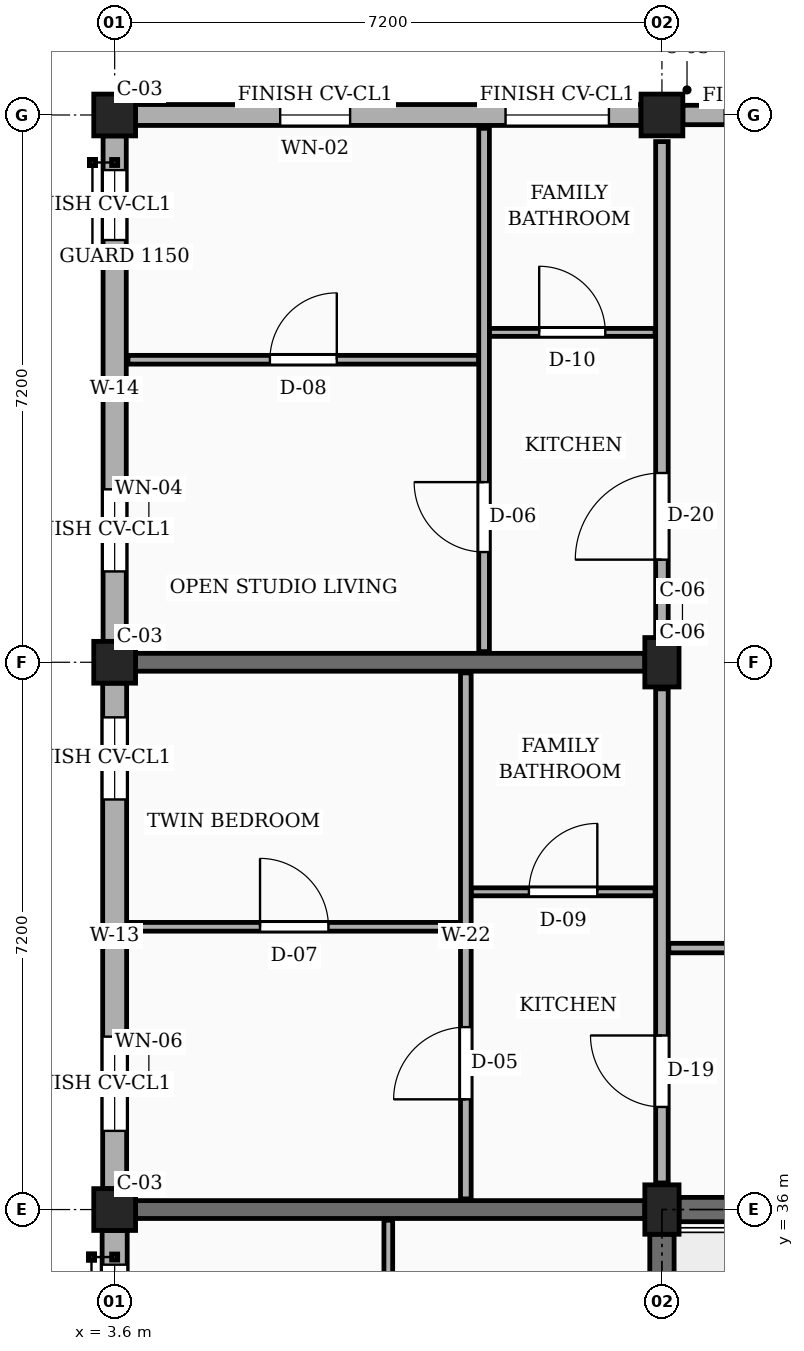
"""IFC4 building model, lengths in metres.
Left out: names, types, materials, properties, quantities, classifications, styles, units other than length and angle.
Written with IfcOpenShell. Run it as: python <this file> out.ifc"""

import sys

from ifc_helpers import new_model, si_unit, direction, frame, frame_2d, origin, origin_2d, place, context, subcontext, project, spatial, rectangle, extrude, element, fill, save


model = new_model("IFC4")
c1 = context("Model", 3, precision=1e-05, world=origin(), true_north=direction((0.0, 1.0)))
c2 = subcontext(c1, "Body", "Model", "MODEL_VIEW")
j1 = project(units=[si_unit("LENGTHUNIT", "METRE"), si_unit("PLANEANGLEUNIT", "RADIAN")], contexts=[c1])
p1 = place(None, origin())
s1 = spatial("IfcSite", under=j1, at=p1, CompositionType="ELEMENT")
p2 = place(p1, origin())
s2 = spatial("IfcBuilding", under=s1, at=p2, CompositionType="ELEMENT")
p3 = place(p2, frame((0.0, 0.0, 13.95)))
s3 = spatial("IfcBuildingStorey", under=s2, at=p3, CompositionType="ELEMENT", Elevation=13.95)
for number, where, z_axis, x_axis in (
    (1, (3.6, 36.0, 0.0), (0.0, 0.0, 1.0), (1.0, 0.0, 0.0)),
    (2, (3.6, 43.2, 0.0), (0.0, 0.0, 1.0), (1.0, 0.0, 0.0)),
    (3, (3.6, 50.4, 0.0), (0.0, 0.0, 1.0), (1.0, 0.0, 0.0)),
):
    element("IfcColumn", number, at=place(p3, frame(where, z_axis=z_axis, x_axis=x_axis)), inside=s3, PredefinedType="COLUMN", context=c2, shape_type="SweptSolid", body=[
        extrude(rectangle(XDim=0.55, YDim=0.55, at=origin_2d()), origin(), (0.0, 0.0, 1.0), 3.15),
    ])
for number, where, z_axis, x_axis in (
    (4, (10.8, 36.0, 0.0), (0.0, 0.0, 1.0), (1.0, 0.0, 0.0)),
    (5, (10.8, 43.2, 0.0), (0.0, 0.0, 1.0), (1.0, 0.0, 0.0)),
):
    element("IfcColumn", number, at=place(p3, frame(where, z_axis=z_axis, x_axis=x_axis)), inside=s3, PredefinedType="COLUMN", context=c2, shape_type="SweptSolid", body=[
        extrude(rectangle(XDim=0.45, YDim=0.65, at=origin_2d()), origin(), (0.0, 0.0, 1.0), 3.15),
    ])
p4 = place(p3, frame((10.8, 50.4, 0.0), z_axis=(0.0, 0.0, 1.0), x_axis=(1.0, 0.0, 0.0)))
e6 = element("IfcColumn", 6, at=p4, inside=s3, PredefinedType="COLUMN", context=c2, shape_type="SweptSolid", body=[
    extrude(rectangle(XDim=0.55, YDim=0.55, at=origin_2d()), origin(), (0.0, 0.0, 1.0), 3.15),
])
for number, where, z_axis, x_axis in (
    (7, (3.875, 36.0, 0.0), (0.0, 0.0, 1.0), (1.0, 0.0, 0.0)),
    (8, (3.875, 43.2, 0.0), (0.0, 0.0, 1.0), (1.0, 0.0, 0.0)),
):
    element("IfcWall", number, at=place(p3, frame(where, z_axis=z_axis, x_axis=x_axis)), inside=s3, PredefinedType="SOLIDWALL", context=c2, shape_type="SweptSolid", body=[
        extrude(rectangle(XDim=6.7, YDim=0.235, at=frame_2d((3.35, 0.0))), origin(), (0.0, 0.0, 1.0), 2.17),
    ])
p5 = place(p3, frame((17.725, 50.4, 0.0), z_axis=(0.0, 0.0, 1.0), x_axis=(-1.0, 0.0, 0.0)))
e9 = element("IfcWall", 9, at=p5, inside=s3, PredefinedType="SOLIDWALL", context=c2, shape_type="SweptSolid", body=[
    extrude(rectangle(XDim=6.65, YDim=0.255, at=frame_2d((3.325, 0.0))), origin(), (0.0, 0.0, 1.0), 2.44),
])
p6 = place(p5, frame((0.45, 0.0, 0.78)))
e10 = element("IfcOpeningElement", 10, at=p6, cuts=e9, PredefinedType="OPENING", context=c2, shape_type="SweptSolid", body=[
    extrude(rectangle(XDim=1.25, YDim=1.44, at=frame_2d((0.625, 0.72))), frame((0.0, 0.137, 0.0), z_axis=(0.0, -1.0, 0.0), x_axis=(1.0, 0.0, 0.0)), (0.0, 0.0, 1.0), 0.275),
])
p7 = place(p5, frame((4.65, 0.0, 0.78)))
e11 = element("IfcOpeningElement", 11, at=p7, cuts=e9, PredefinedType="OPENING", context=c2, shape_type="SweptSolid", body=[
    extrude(rectangle(XDim=1.45, YDim=1.44, at=frame_2d((0.725, 0.72))), frame((0.0, 0.137, 0.0), z_axis=(0.0, -1.0, 0.0), x_axis=(1.0, 0.0, 0.0)), (0.0, 0.0, 1.0), 0.275),
])
p8 = place(p3, frame((10.525, 50.4, 0.0), z_axis=(0.0, 0.0, 1.0), x_axis=(-1.0, 0.0, 0.0)))
e12 = element("IfcWall", 12, at=p8, inside=s3, PredefinedType="SOLIDWALL", context=c2, shape_type="SweptSolid", body=[
    extrude(rectangle(XDim=6.65, YDim=0.275, at=frame_2d((3.325, 0.0))), origin(), (0.0, 0.0, 1.0), 2.44),
])
p9 = place(p8, frame((0.423, 0.0, 0.78)))
e13 = element("IfcOpeningElement", 13, at=p9, cuts=e12, PredefinedType="OPENING", context=c2, shape_type="SweptSolid", body=[
    extrude(rectangle(XDim=1.36, YDim=1.26, at=frame_2d((0.68, 0.63))), frame((0.0, 0.147, 0.0), z_axis=(0.0, -1.0, 0.0), x_axis=(1.0, 0.0, 0.0)), (0.0, 0.0, 1.0), 0.295),
])
p10 = place(p8, frame((3.827, 0.0, 0.78)))
e14 = element("IfcOpeningElement", 14, at=p10, cuts=e12, PredefinedType="OPENING", context=c2, shape_type="SweptSolid", body=[
    extrude(rectangle(XDim=0.92, YDim=1.15, at=frame_2d((0.46, 0.575))), frame((0.0, 0.147, 0.0), z_axis=(0.0, -1.0, 0.0), x_axis=(1.0, 0.0, 0.0)), (0.0, 0.0, 1.0), 0.295),
])
p11 = place(p3, frame((3.6, 50.125, 0.0), z_axis=(0.0, 0.0, 1.0), x_axis=(0.0, -1.0, 0.0)))
e15 = element("IfcWall", 15, at=p11, inside=s3, PredefinedType="SOLIDWALL", context=c2, shape_type="SweptSolid", body=[
    extrude(rectangle(XDim=6.65, YDim=0.305, at=frame_2d((3.325, 0.0))), origin(), (0.0, 0.0, 1.0), 2.44),
])
p12 = place(p11, frame((0.45, 0.0, 0.78)))
e16 = element("IfcOpeningElement", 16, at=p12, cuts=e15, PredefinedType="OPENING", context=c2, shape_type="SweptSolid", body=[
    extrude(rectangle(XDim=0.92, YDim=1.15, at=frame_2d((0.46, 0.575))), frame((0.0, 0.163, 0.0), z_axis=(0.0, -1.0, 0.0), x_axis=(1.0, 0.0, 0.0)), (0.0, 0.0, 1.0), 0.325),
])
p13 = place(p11, frame((4.65, 0.0, 0.78)))
e17 = element("IfcOpeningElement", 17, at=p13, cuts=e15, PredefinedType="OPENING", context=c2, shape_type="SweptSolid", body=[
    extrude(rectangle(XDim=1.08, YDim=1.15, at=frame_2d((0.54, 0.575))), frame((0.0, 0.163, 0.0), z_axis=(0.0, -1.0, 0.0), x_axis=(1.0, 0.0, 0.0)), (0.0, 0.0, 1.0), 0.325),
])
p14 = place(p3, frame((3.6, 42.925, 0.0), z_axis=(0.0, 0.0, 1.0), x_axis=(0.0, -1.0, 0.0)))
e18 = element("IfcWall", 18, at=p14, inside=s3, PredefinedType="SOLIDWALL", context=c2, shape_type="SweptSolid", body=[
    extrude(rectangle(XDim=6.65, YDim=0.315, at=frame_2d((3.325, 0.0))), origin(), (0.0, 0.0, 1.0), 2.44),
])
p15 = place(p14, frame((0.45, 0.0, 0.78)))
e19 = element("IfcOpeningElement", 19, at=p15, cuts=e18, PredefinedType="OPENING", context=c2, shape_type="SweptSolid", body=[
    extrude(rectangle(XDim=1.08, YDim=1.15, at=frame_2d((0.54, 0.575))), frame((0.0, 0.167, 0.0), z_axis=(0.0, -1.0, 0.0), x_axis=(1.0, 0.0, 0.0)), (0.0, 0.0, 1.0), 0.335),
])
p16 = place(p14, frame((4.65, 0.0, 0.78)))
e20 = element("IfcOpeningElement", 20, at=p16, cuts=e18, PredefinedType="OPENING", context=c2, shape_type="SweptSolid", body=[
    extrude(rectangle(XDim=1.24, YDim=1.15, at=frame_2d((0.62, 0.575))), frame((0.0, 0.167, 0.0), z_axis=(0.0, -1.0, 0.0), x_axis=(1.0, 0.0, 0.0)), (0.0, 0.0, 1.0), 0.335),
])
p17 = place(p3, frame((3.6, 35.725, 0.0), z_axis=(0.0, 0.0, 1.0), x_axis=(0.0, -1.0, 0.0)))
e21 = element("IfcWall", 21, at=p17, inside=s3, PredefinedType="SOLIDWALL", context=c2, shape_type="SweptSolid", body=[
    extrude(rectangle(XDim=6.65, YDim=0.33, at=frame_2d((3.325, 0.0))), origin(), (0.0, 0.0, 1.0), 2.44),
])
p18 = place(p17, frame((0.45, 0.0, 0.78)))
e22 = element("IfcOpeningElement", 22, at=p18, cuts=e21, PredefinedType="OPENING", context=c2, shape_type="SweptSolid", body=[
    extrude(rectangle(XDim=1.24, YDim=1.15, at=frame_2d((0.62, 0.575))), frame((0.0, 0.175, 0.0), z_axis=(0.0, -1.0, 0.0), x_axis=(1.0, 0.0, 0.0)), (0.0, 0.0, 1.0), 0.35),
])
p19 = place(p17, frame((4.65, 0.0, 0.78)))
e23 = element("IfcOpeningElement", 23, at=p19, cuts=e21, PredefinedType="OPENING", context=c2, shape_type="SweptSolid", body=[
    extrude(rectangle(XDim=1.4, YDim=1.15, at=frame_2d((0.7, 0.575))), frame((0.0, 0.175, 0.0), z_axis=(0.0, -1.0, 0.0), x_axis=(1.0, 0.0, 0.0)), (0.0, 0.0, 1.0), 0.35),
])
p20 = place(p3, frame((10.8, 29.125, 0.0), z_axis=(0.0, 0.0, 1.0), x_axis=(0.0, 1.0, 0.0)))
e24 = element("IfcWall", 24, at=p20, inside=s3, PredefinedType="SHEAR", context=c2, shape_type="SweptSolid", body=[
    extrude(rectangle(XDim=6.55, YDim=0.32, at=frame_2d((3.275, 0.0))), origin(), (0.0, 0.0, 1.0), 2.87),
])
p21 = place(p3, frame((11.025, 36.0, 0.0), z_axis=(0.0, 0.0, 1.0), x_axis=(1.0, 0.0, 0.0)))
e25 = element("IfcWall", 25, at=p21, inside=s3, PredefinedType="SHEAR", context=c2, shape_type="SweptSolid", body=[
    extrude(rectangle(XDim=6.75, YDim=0.32, at=frame_2d((3.375, 0.0))), origin(), (0.0, 0.0, 1.0), 2.87),
])
p22 = place(p3, frame((10.8, 36.35, 0.0), z_axis=(0.0, 0.0, 1.0), x_axis=(0.0, 1.0, 0.0)))
e26 = element("IfcWall", 26, at=p22, inside=s3, PredefinedType="PARTITIONING", context=c2, shape_type="SweptSolid", body=[
    extrude(rectangle(XDim=6.5, YDim=0.165, at=frame_2d((3.25, 0.0))), origin(), (0.0, 0.0, 1.0), 2.305),
])
p23 = place(p22, frame((1.0, 0.0, 0.0)))
e27 = element("IfcOpeningElement", 27, at=p23, cuts=e26, PredefinedType="OPENING", context=c2, shape_type="SweptSolid", body=[
    extrude(rectangle(XDim=0.94, YDim=2.12, at=frame_2d((0.47, 1.06))), frame((0.0, 0.093, 0.0), z_axis=(0.0, -1.0, 0.0), x_axis=(1.0, 0.0, 0.0)), (0.0, 0.0, 1.0), 0.185),
])
p24 = place(p3, frame((10.8, 43.55, 0.0), z_axis=(0.0, 0.0, 1.0), x_axis=(0.0, 1.0, 0.0)))
e28 = element("IfcWall", 28, at=p24, inside=s3, PredefinedType="PARTITIONING", context=c2, shape_type="SweptSolid", body=[
    extrude(rectangle(XDim=6.5, YDim=0.165, at=frame_2d((3.25, 0.0))), origin(), (0.0, 0.0, 1.0), 2.305),
])
p25 = place(p24, frame((1.0, 0.0, 0.0)))
e29 = element("IfcOpeningElement", 29, at=p25, cuts=e28, PredefinedType="OPENING", context=c2, shape_type="SweptSolid", body=[
    extrude(rectangle(XDim=1.14, YDim=2.18, at=frame_2d((0.57, 1.09))), frame((0.0, 0.093, 0.0), z_axis=(0.0, -1.0, 0.0), x_axis=(1.0, 0.0, 0.0)), (0.0, 0.0, 1.0), 0.185),
])
p26 = place(p3, frame((7.2, 28.94, 0.0), z_axis=(0.0, 0.0, 1.0), x_axis=(0.0, 1.0, 0.0)))
e30 = element("IfcWall", 30, at=p26, inside=s3, PredefinedType="PARTITIONING", context=c2, shape_type="SweptSolid", body=[
    extrude(rectangle(XDim=6.92, YDim=0.115, at=frame_2d((3.46, 0.0))), origin(), (0.0, 0.0, 1.0), 2.305),
])
p27 = place(p26, frame((1.05, 0.0, 0.0)))
e31 = element("IfcOpeningElement", 31, at=p27, cuts=e30, PredefinedType="OPENING", context=c2, shape_type="SweptSolid", body=[
    extrude(rectangle(XDim=0.87, YDim=2.05, at=frame_2d((0.435, 1.025))), frame((0.0, 0.067, 0.0), z_axis=(0.0, -1.0, 0.0), x_axis=(1.0, 0.0, 0.0)), (0.0, 0.0, 1.0), 0.135),
])
p28 = place(p26, frame((4.45, 0.0, 0.0)))
e32 = element("IfcOpeningElement", 32, at=p28, cuts=e30, PredefinedType="OPENING", context=c2, shape_type="SweptSolid", body=[
    extrude(rectangle(XDim=0.88, YDim=2.08, at=frame_2d((0.44, 1.04))), frame((0.0, 0.067, 0.0), z_axis=(0.0, -1.0, 0.0), x_axis=(1.0, 0.0, 0.0)), (0.0, 0.0, 1.0), 0.135),
])
p29 = place(p3, frame((10.89, 39.44, 0.0), z_axis=(0.0, 0.0, 1.0), x_axis=(1.0, 0.0, 0.0)))
e33 = element("IfcWall", 33, at=p29, inside=s3, PredefinedType="PARTITIONING", context=c2, shape_type="SweptSolid", body=[
    extrude(rectangle(XDim=7.02, YDim=0.125, at=frame_2d((3.51, 0.0))), origin(), (0.0, 0.0, 1.0), 2.305),
])
p30 = place(p29, frame((2.85, 0.0, 0.0)))
e34 = element("IfcOpeningElement", 34, at=p30, cuts=e33, PredefinedType="OPENING", context=c2, shape_type="SweptSolid", body=[
    extrude(rectangle(XDim=1.02, YDim=2.15, at=frame_2d((0.51, 1.075))), frame((0.0, 0.073, 0.0), z_axis=(0.0, -1.0, 0.0), x_axis=(1.0, 0.0, 0.0)), (0.0, 0.0, 1.0), 0.145),
])
p31 = place(p3, frame((3.775, 39.72, 0.0), z_axis=(0.0, 0.0, 1.0), x_axis=(1.0, 0.0, 0.0)))
e35 = element("IfcWall", 35, at=p31, inside=s3, PredefinedType="PARTITIONING", context=c2, shape_type="SweptSolid", body=[
    extrude(rectangle(XDim=4.375, YDim=0.115, at=frame_2d((2.188, 0.0))), origin(), (0.0, 0.0, 1.0), 2.305),
])
p32 = place(p31, frame((1.738, 0.0, 0.0)))
e36 = element("IfcOpeningElement", 36, at=p32, cuts=e35, PredefinedType="OPENING", context=c2, shape_type="SweptSolid", body=[
    extrude(rectangle(XDim=0.9, YDim=2.1, at=frame_2d((0.45, 1.05))), frame((0.0, 0.067, 0.0), z_axis=(0.0, -1.0, 0.0), x_axis=(1.0, 0.0, 0.0)), (0.0, 0.0, 1.0), 0.135),
])
p33 = place(p3, frame((8.29, 40.18, 0.0), z_axis=(0.0, 0.0, 1.0), x_axis=(1.0, 0.0, 0.0)))
e37 = element("IfcWall", 37, at=p33, inside=s3, PredefinedType="PARTITIONING", context=c2, shape_type="SweptSolid", body=[
    extrude(rectangle(XDim=2.42, YDim=0.105, at=frame_2d((1.21, 0.0))), origin(), (0.0, 0.0, 1.0), 2.305),
])
p34 = place(p33, frame((0.76, 0.0, 0.0)))
e38 = element("IfcOpeningElement", 38, at=p34, cuts=e37, PredefinedType="OPENING", context=c2, shape_type="SweptSolid", body=[
    extrude(rectangle(XDim=0.9, YDim=2.05, at=frame_2d((0.45, 1.025))), frame((0.0, 0.062, 0.0), z_axis=(0.0, -1.0, 0.0), x_axis=(1.0, 0.0, 0.0)), (0.0, 0.0, 1.0), 0.125),
])
p35 = place(p3, frame((8.22, 36.14, 0.0), z_axis=(0.0, 0.0, 1.0), x_axis=(0.0, 1.0, 0.0)))
e39 = element("IfcWall", 39, at=p35, inside=s3, PredefinedType="PARTITIONING", context=c2, shape_type="SweptSolid", body=[
    extrude(rectangle(XDim=6.92, YDim=0.14, at=frame_2d((3.46, 0.0))), origin(), (0.0, 0.0, 1.0), 2.305),
])
p36 = place(p35, frame((1.31, 0.0, 0.0)))
e40 = element("IfcOpeningElement", 40, at=p36, cuts=e39, PredefinedType="OPENING", context=c2, shape_type="SweptSolid", body=[
    extrude(rectangle(XDim=0.95, YDim=2.1, at=frame_2d((0.475, 1.05))), frame((0.0, 0.08, 0.0), z_axis=(0.0, -1.0, 0.0), x_axis=(1.0, 0.0, 0.0)), (0.0, 0.0, 1.0), 0.16),
])
p37 = place(p3, frame((3.775, 47.18, 0.0), z_axis=(0.0, 0.0, 1.0), x_axis=(1.0, 0.0, 0.0)))
e41 = element("IfcWall", 41, at=p37, inside=s3, PredefinedType="PARTITIONING", context=c2, shape_type="SweptSolid", body=[
    extrude(rectangle(XDim=4.615, YDim=0.115, at=frame_2d((2.308, 0.0))), origin(), (0.0, 0.0, 1.0), 2.305),
])
p38 = place(p37, frame((1.867, 0.0, 0.0)))
e42 = element("IfcOpeningElement", 42, at=p38, cuts=e41, PredefinedType="OPENING", context=c2, shape_type="SweptSolid", body=[
    extrude(rectangle(XDim=0.88, YDim=2.08, at=frame_2d((0.44, 1.04))), frame((0.0, 0.067, 0.0), z_axis=(0.0, -1.0, 0.0), x_axis=(1.0, 0.0, 0.0)), (0.0, 0.0, 1.0), 0.135),
])
p39 = place(p3, frame((8.53, 47.54, 0.0), z_axis=(0.0, 0.0, 1.0), x_axis=(1.0, 0.0, 0.0)))
e43 = element("IfcWall", 43, at=p39, inside=s3, PredefinedType="PARTITIONING", context=c2, shape_type="SweptSolid", body=[
    extrude(rectangle(XDim=2.18, YDim=0.105, at=frame_2d((1.09, 0.0))), origin(), (0.0, 0.0, 1.0), 2.305),
])
p40 = place(p39, frame((0.655, 0.0, 0.0)))
e44 = element("IfcOpeningElement", 44, at=p40, cuts=e43, PredefinedType="OPENING", context=c2, shape_type="SweptSolid", body=[
    extrude(rectangle(XDim=0.87, YDim=2.05, at=frame_2d((0.435, 1.025))), frame((0.0, 0.062, 0.0), z_axis=(0.0, -1.0, 0.0), x_axis=(1.0, 0.0, 0.0)), (0.0, 0.0, 1.0), 0.125),
])
p41 = place(p3, frame((8.46, 43.34, 0.0), z_axis=(0.0, 0.0, 1.0), x_axis=(0.0, 1.0, 0.0)))
e45 = element("IfcWall", 45, at=p41, inside=s3, PredefinedType="PARTITIONING", context=c2, shape_type="SweptSolid", body=[
    extrude(rectangle(XDim=6.885, YDim=0.14, at=frame_2d((3.442, 0.0))), origin(), (0.0, 0.0, 1.0), 2.305),
])
p42 = place(p41, frame((1.31, 0.0, 0.0)))
e46 = element("IfcOpeningElement", 46, at=p42, cuts=e45, PredefinedType="OPENING", context=c2, shape_type="SweptSolid", body=[
    extrude(rectangle(XDim=0.92, YDim=2.1, at=frame_2d((0.46, 1.05))), frame((0.0, 0.08, 0.0), z_axis=(0.0, -1.0, 0.0), x_axis=(1.0, 0.0, 0.0)), (0.0, 0.0, 1.0), 0.16),
])
p43 = place(p9, origin())
e47 = element("IfcWindow", 47, at=p43, inside=s3, PartitioningType="SINGLE_PANEL", PredefinedType="WINDOW", context=c2, shape_type="SweptSolid", body=[
    extrude(rectangle(XDim=1.36, YDim=1.26, at=frame_2d((0.68, 0.63))), frame((0.0, 0.03, 0.0), z_axis=(0.0, -1.0, 0.0), x_axis=(1.0, 0.0, 0.0)), (0.0, 0.0, 1.0), 0.06),
])
fill(e13, e47)
p44 = place(p10, origin())
e48 = element("IfcWindow", 48, at=p44, inside=s3, PartitioningType="SINGLE_PANEL", PredefinedType="WINDOW", context=c2, shape_type="SweptSolid", body=[
    extrude(rectangle(XDim=0.92, YDim=1.15, at=frame_2d((0.46, 0.575))), frame((0.0, 0.03, 0.0), z_axis=(0.0, -1.0, 0.0), x_axis=(1.0, 0.0, 0.0)), (0.0, 0.0, 1.0), 0.06),
])
fill(e14, e48)
p45 = place(p12, origin())
e49 = element("IfcWindow", 49, at=p45, inside=s3, PartitioningType="SINGLE_PANEL", PredefinedType="WINDOW", context=c2, shape_type="SweptSolid", body=[
    extrude(rectangle(XDim=0.92, YDim=1.15, at=frame_2d((0.46, 0.575))), frame((0.0, 0.03, 0.0), z_axis=(0.0, -1.0, 0.0), x_axis=(1.0, 0.0, 0.0)), (0.0, 0.0, 1.0), 0.06),
])
fill(e16, e49)
p46 = place(p13, origin())
e50 = element("IfcWindow", 50, at=p46, inside=s3, PartitioningType="SINGLE_PANEL", PredefinedType="WINDOW", context=c2, shape_type="SweptSolid", body=[
    extrude(rectangle(XDim=1.08, YDim=1.15, at=frame_2d((0.54, 0.575))), frame((0.0, 0.03, 0.0), z_axis=(0.0, -1.0, 0.0), x_axis=(1.0, 0.0, 0.0)), (0.0, 0.0, 1.0), 0.06),
])
fill(e17, e50)
p47 = place(p15, origin())
e51 = element("IfcWindow", 51, at=p47, inside=s3, PartitioningType="SINGLE_PANEL", PredefinedType="WINDOW", context=c2, shape_type="SweptSolid", body=[
    extrude(rectangle(XDim=1.08, YDim=1.15, at=frame_2d((0.54, 0.575))), frame((0.0, 0.03, 0.0), z_axis=(0.0, -1.0, 0.0), x_axis=(1.0, 0.0, 0.0)), (0.0, 0.0, 1.0), 0.06),
])
fill(e19, e51)
p48 = place(p16, origin())
e52 = element("IfcWindow", 52, at=p48, inside=s3, PartitioningType="SINGLE_PANEL", PredefinedType="WINDOW", context=c2, shape_type="SweptSolid", body=[
    extrude(rectangle(XDim=1.24, YDim=1.15, at=frame_2d((0.62, 0.575))), frame((0.0, 0.03, 0.0), z_axis=(0.0, -1.0, 0.0), x_axis=(1.0, 0.0, 0.0)), (0.0, 0.0, 1.0), 0.06),
])
fill(e20, e52)
p49 = place(p18, origin())
e53 = element("IfcWindow", 53, at=p49, inside=s3, PartitioningType="SINGLE_PANEL", PredefinedType="WINDOW", context=c2, shape_type="SweptSolid", body=[
    extrude(rectangle(XDim=1.24, YDim=1.15, at=frame_2d((0.62, 0.575))), frame((0.0, 0.03, 0.0), z_axis=(0.0, -1.0, 0.0), x_axis=(1.0, 0.0, 0.0)), (0.0, 0.0, 1.0), 0.06),
])
fill(e22, e53)
p50 = place(p23, origin())
e54 = element("IfcDoor", 54, at=p50, inside=s3, OperationType="SINGLE_SWING_RIGHT", PredefinedType="DOOR", context=c2, shape_type="SweptSolid", body=[
    extrude(rectangle(XDim=0.94, YDim=2.12, at=frame_2d((0.47, 1.06))), frame((0.0, 0.025, 0.0), z_axis=(0.0, -1.0, 0.0), x_axis=(1.0, 0.0, 0.0)), (0.0, 0.0, 1.0), 0.05),
])
fill(e27, e54)
p51 = place(p25, origin())
e55 = element("IfcDoor", 55, at=p51, inside=s3, OperationType="SINGLE_SWING_LEFT", PredefinedType="DOOR", context=c2, shape_type="SweptSolid", body=[
    extrude(rectangle(XDim=1.14, YDim=2.18, at=frame_2d((0.57, 1.09))), frame((0.0, 0.025, 0.0), z_axis=(0.0, -1.0, 0.0), x_axis=(1.0, 0.0, 0.0)), (0.0, 0.0, 1.0), 0.05),
])
fill(e29, e55)
p52 = place(p32, origin())
e56 = element("IfcDoor", 56, at=p52, inside=s3, OperationType="SINGLE_SWING_LEFT", PredefinedType="DOOR", context=c2, shape_type="SweptSolid", body=[
    extrude(rectangle(XDim=0.9, YDim=2.1, at=frame_2d((0.45, 1.05))), frame((0.0, 0.025, 0.0), z_axis=(0.0, -1.0, 0.0), x_axis=(1.0, 0.0, 0.0)), (0.0, 0.0, 1.0), 0.05),
])
fill(e36, e56)
p53 = place(p34, origin())
e57 = element("IfcDoor", 57, at=p53, inside=s3, OperationType="SINGLE_SWING_RIGHT", PredefinedType="DOOR", context=c2, shape_type="SweptSolid", body=[
    extrude(rectangle(XDim=0.9, YDim=2.05, at=frame_2d((0.45, 1.025))), frame((0.0, 0.025, 0.0), z_axis=(0.0, -1.0, 0.0), x_axis=(1.0, 0.0, 0.0)), (0.0, 0.0, 1.0), 0.05),
])
fill(e38, e57)
p54 = place(p36, origin())
e58 = element("IfcDoor", 58, at=p54, inside=s3, OperationType="SINGLE_SWING_LEFT", PredefinedType="DOOR", context=c2, shape_type="SweptSolid", body=[
    extrude(rectangle(XDim=0.95, YDim=2.1, at=frame_2d((0.475, 1.05))), frame((0.0, 0.025, 0.0), z_axis=(0.0, -1.0, 0.0), x_axis=(1.0, 0.0, 0.0)), (0.0, 0.0, 1.0), 0.05),
])
fill(e40, e58)
p55 = place(p38, origin())
e59 = element("IfcDoor", 59, at=p55, inside=s3, OperationType="SINGLE_SWING_RIGHT", PredefinedType="DOOR", context=c2, shape_type="SweptSolid", body=[
    extrude(rectangle(XDim=0.88, YDim=2.08, at=frame_2d((0.44, 1.04))), frame((0.0, 0.025, 0.0), z_axis=(0.0, -1.0, 0.0), x_axis=(1.0, 0.0, 0.0)), (0.0, 0.0, 1.0), 0.05),
])
fill(e42, e59)
p56 = place(p40, origin())
e60 = element("IfcDoor", 60, at=p56, inside=s3, OperationType="SINGLE_SWING_LEFT", PredefinedType="DOOR", context=c2, shape_type="SweptSolid", body=[
    extrude(rectangle(XDim=0.87, YDim=2.05, at=frame_2d((0.435, 1.025))), frame((0.0, 0.025, 0.0), z_axis=(0.0, -1.0, 0.0), x_axis=(1.0, 0.0, 0.0)), (0.0, 0.0, 1.0), 0.05),
])
fill(e44, e60)
p57 = place(p42, origin())
e61 = element("IfcDoor", 61, at=p57, inside=s3, OperationType="SINGLE_SWING_RIGHT", PredefinedType="DOOR", context=c2, shape_type="SweptSolid", body=[
    extrude(rectangle(XDim=0.92, YDim=2.1, at=frame_2d((0.46, 1.05))), frame((0.0, 0.025, 0.0), z_axis=(0.0, -1.0, 0.0), x_axis=(1.0, 0.0, 0.0)), (0.0, 0.0, 1.0), 0.05),
])
fill(e46, e61)
save(model, sys.argv[1])
